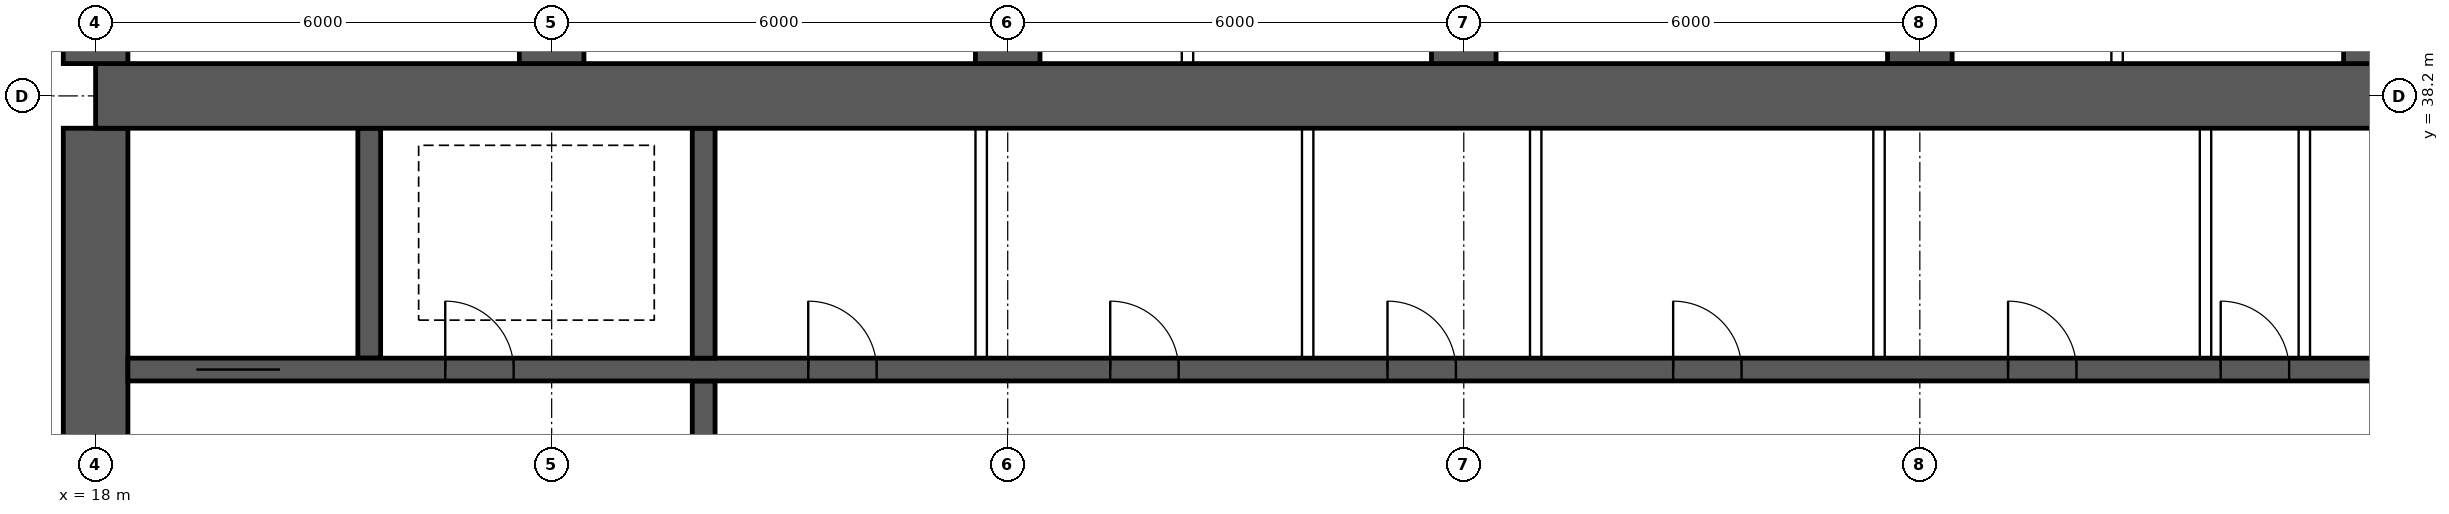
"""IFC4 building model, lengths in metres.
Left out: names, types, materials, properties, quantities, classifications, styles, units other than length and angle.
Written with IfcOpenShell. Run it as: python <this file> out.ifc"""

import sys

from ifc_helpers import new_model, si_unit, direction, frame, frame_2d, origin, place, context, subcontext, project, spatial, rectangle, extrude, element, fill, save


model = new_model("IFC4")
c1 = context("Model", 3, precision=1e-05, world=origin(), true_north=direction((0.0, 1.0)))
c2 = subcontext(c1, "Body", "Model", "MODEL_VIEW")
j1 = project(units=[si_unit("LENGTHUNIT", "METRE"), si_unit("PLANEANGLEUNIT", "RADIAN")], contexts=[c1])
p1 = place(None, origin())
s1 = spatial("IfcSite", under=j1, at=p1, CompositionType="ELEMENT")
p2 = place(p1, origin())
s2 = spatial("IfcBuilding", under=s1, at=p2, CompositionType="ELEMENT")
p3 = place(p2, frame((0.0, 0.0, 178.6)))
s3 = spatial("IfcBuildingStorey", under=s2, at=p3, CompositionType="ELEMENT", Elevation=178.6)
p4 = place(p3, frame((18.0, 38.2, 0.0), z_axis=(0.0, 0.0, 1.0), x_axis=(1.0, 0.0, 0.0)))
e1 = element("IfcWall", 1, at=p4, inside=s3, PredefinedType="SHEAR", context=c2, shape_type="SweptSolid", body=[
    extrude(rectangle(XDim=48.0, YDim=0.85, at=frame_2d((24.0, 0.0))), origin(), (0.0, 0.0, 1.0), 3.75),
])
p5 = place(p3, frame((18.0, 26.225, 0.0), z_axis=(0.0, 0.0, 1.0), x_axis=(0.0, 1.0, 0.0)))
e2 = element("IfcWall", 2, at=p5, inside=s3, PredefinedType="SHEAR", context=c2, shape_type="SweptSolid", body=[
    extrude(rectangle(XDim=11.55, YDim=0.85, at=frame_2d((5.775, 0.0))), origin(), (0.0, 0.0, 1.0), 3.75),
])
p6 = place(p5, frame((5.075, 0.0, 0.0)))
e3 = element("IfcOpeningElement", 3, at=p6, cuts=e2, PredefinedType="OPENING", context=c2, shape_type="SweptSolid", body=[
    extrude(rectangle(XDim=1.2, YDim=2.1, at=frame_2d((0.6, 1.05))), frame((0.0, 0.435, 0.0), z_axis=(0.0, -1.0, 0.0), x_axis=(1.0, 0.0, 0.0)), (0.0, 0.0, 1.0), 0.87),
])
p7 = place(p3, frame((18.425, 34.6, 0.0), z_axis=(0.0, 0.0, 1.0), x_axis=(1.0, 0.0, 0.0)))
e4 = element("IfcWall", 4, at=p7, inside=s3, PredefinedType="SHEAR", context=c2, shape_type="SweptSolid", body=[
    extrude(rectangle(XDim=47.15, YDim=0.3, at=frame_2d((23.575, 0.0))), origin(), (0.0, 0.0, 1.0), 3.75),
])
p8 = place(p7, frame((0.9, 0.0, 0.0)))
e5 = element("IfcOpeningElement", 5, at=p8, cuts=e4, PredefinedType="OPENING", context=c2, shape_type="SweptSolid", body=[
    extrude(rectangle(XDim=1.1, YDim=2.1, at=frame_2d((0.55, 1.05))), frame((0.0, 0.16, 0.0), z_axis=(0.0, -1.0, 0.0), x_axis=(1.0, 0.0, 0.0)), (0.0, 0.0, 1.0), 0.32),
])
p9 = place(p7, frame((45.15, 0.0, 0.0)))
e6 = element("IfcOpeningElement", 6, at=p9, cuts=e4, PredefinedType="OPENING", context=c2, shape_type="SweptSolid", body=[
    extrude(rectangle(XDim=1.1, YDim=2.1, at=frame_2d((0.55, 1.05))), frame((0.0, 0.16, 0.0), z_axis=(0.0, -1.0, 0.0), x_axis=(1.0, 0.0, 0.0)), (0.0, 0.0, 1.0), 0.32),
])
p10 = place(p7, frame((4.175, 0.0, 0.0)))
e7 = element("IfcOpeningElement", 7, at=p10, cuts=e4, PredefinedType="OPENING", context=c2, shape_type="SweptSolid", body=[
    extrude(rectangle(XDim=0.9, YDim=2.1, at=frame_2d((0.45, 1.05))), frame((0.0, 0.16, 0.0), z_axis=(0.0, -1.0, 0.0), x_axis=(1.0, 0.0, 0.0)), (0.0, 0.0, 1.0), 0.32),
])
p11 = place(p7, frame((42.075, 0.0, 0.0)))
e8 = element("IfcOpeningElement", 8, at=p11, cuts=e4, PredefinedType="OPENING", context=c2, shape_type="SweptSolid", body=[
    extrude(rectangle(XDim=0.9, YDim=2.1, at=frame_2d((0.45, 1.05))), frame((0.0, 0.16, 0.0), z_axis=(0.0, -1.0, 0.0), x_axis=(1.0, 0.0, 0.0)), (0.0, 0.0, 1.0), 0.32),
])
p12 = place(p7, frame((8.95, 0.0, 0.0)))
e9 = element("IfcOpeningElement", 9, at=p12, cuts=e4, PredefinedType="OPENING", context=c2, shape_type="SweptSolid", body=[
    extrude(rectangle(XDim=0.9, YDim=2.1, at=frame_2d((0.45, 1.05))), frame((0.0, 0.16, 0.0), z_axis=(0.0, -1.0, 0.0), x_axis=(1.0, 0.0, 0.0)), (0.0, 0.0, 1.0), 0.32),
])
p13 = place(p7, frame((12.924, 0.0, 0.0)))
e10 = element("IfcOpeningElement", 10, at=p13, cuts=e4, PredefinedType="OPENING", context=c2, shape_type="SweptSolid", body=[
    extrude(rectangle(XDim=0.9, YDim=2.1, at=frame_2d((0.45, 1.05))), frame((0.0, 0.16, 0.0), z_axis=(0.0, -1.0, 0.0), x_axis=(1.0, 0.0, 0.0)), (0.0, 0.0, 1.0), 0.32),
])
p14 = place(p7, frame((16.571, 0.0, 0.0)))
e11 = element("IfcOpeningElement", 11, at=p14, cuts=e4, PredefinedType="OPENING", context=c2, shape_type="SweptSolid", body=[
    extrude(rectangle(XDim=0.9, YDim=2.1, at=frame_2d((0.45, 1.05))), frame((0.0, 0.16, 0.0), z_axis=(0.0, -1.0, 0.0), x_axis=(1.0, 0.0, 0.0)), (0.0, 0.0, 1.0), 0.32),
])
p15 = place(p7, frame((20.33, 0.0, 0.0)))
e12 = element("IfcOpeningElement", 12, at=p15, cuts=e4, PredefinedType="OPENING", context=c2, shape_type="SweptSolid", body=[
    extrude(rectangle(XDim=0.9, YDim=2.1, at=frame_2d((0.45, 1.05))), frame((0.0, 0.16, 0.0), z_axis=(0.0, -1.0, 0.0), x_axis=(1.0, 0.0, 0.0)), (0.0, 0.0, 1.0), 0.32),
])
p16 = place(p7, frame((24.736, 0.0, 0.0)))
e13 = element("IfcOpeningElement", 13, at=p16, cuts=e4, PredefinedType="OPENING", context=c2, shape_type="SweptSolid", body=[
    extrude(rectangle(XDim=0.9, YDim=2.1, at=frame_2d((0.45, 1.05))), frame((0.0, 0.16, 0.0), z_axis=(0.0, -1.0, 0.0), x_axis=(1.0, 0.0, 0.0)), (0.0, 0.0, 1.0), 0.32),
])
p17 = place(p7, frame((27.533, 0.0, 0.0)))
e14 = element("IfcOpeningElement", 14, at=p17, cuts=e4, PredefinedType="OPENING", context=c2, shape_type="SweptSolid", body=[
    extrude(rectangle(XDim=0.9, YDim=2.1, at=frame_2d((0.45, 1.05))), frame((0.0, 0.16, 0.0), z_axis=(0.0, -1.0, 0.0), x_axis=(1.0, 0.0, 0.0)), (0.0, 0.0, 1.0), 0.32),
])
p18 = place(p7, frame((33.654, 0.0, 0.0)))
e15 = element("IfcOpeningElement", 15, at=p18, cuts=e4, PredefinedType="OPENING", context=c2, shape_type="SweptSolid", body=[
    extrude(rectangle(XDim=0.9, YDim=2.1, at=frame_2d((0.45, 1.05))), frame((0.0, 0.16, 0.0), z_axis=(0.0, -1.0, 0.0), x_axis=(1.0, 0.0, 0.0)), (0.0, 0.0, 1.0), 0.32),
])
p19 = place(p3, frame((26.0, 30.55, 0.0), z_axis=(0.0, 0.0, 1.0), x_axis=(0.0, 1.0, 0.0)))
e16 = element("IfcWall", 16, at=p19, inside=s3, PredefinedType="SHEAR", context=c2, shape_type="SweptSolid", body=[
    extrude(rectangle(XDim=3.9, YDim=0.3, at=frame_2d((1.95, 0.0))), origin(), (0.0, 0.0, 1.0), 3.75),
])
p20 = place(p19, frame((1.4, 0.0, 0.0)))
e17 = element("IfcOpeningElement", 17, at=p20, cuts=e16, PredefinedType="OPENING", context=c2, shape_type="SweptSolid", body=[
    extrude(rectangle(XDim=1.2, YDim=2.1, at=frame_2d((0.6, 1.05))), frame((0.0, 0.16, 0.0), z_axis=(0.0, -1.0, 0.0), x_axis=(1.0, 0.0, 0.0)), (0.0, 0.0, 1.0), 0.32),
])
for number, where, z_axis, x_axis in (
    (18, (21.6, 34.75, 0.0), (0.0, 0.0, 1.0), (0.0, 1.0, 0.0)),
    (19, (26.0, 34.75, 0.0), (0.0, 0.0, 1.0), (0.0, 1.0, 0.0)),
):
    element("IfcWall", number, at=place(p3, frame(where, z_axis=z_axis, x_axis=x_axis)), inside=s3, PredefinedType="SHEAR", context=c2, shape_type="SweptSolid", body=[
        extrude(rectangle(XDim=3.025, YDim=0.3, at=frame_2d((1.512, 0.0))), origin(), (0.0, 0.0, 1.0), 3.75),
    ])
for number, where, z_axis, x_axis in (
    (20, (18.0, 38.625, 0.0), (0.0, 0.0, 1.0), (0.0, 1.0, 0.0)),
    (21, (24.0, 38.625, 0.0), (0.0, 0.0, 1.0), (0.0, 1.0, 0.0)),
    (22, (30.0, 38.625, 0.0), (0.0, 0.0, 1.0), (0.0, 1.0, 0.0)),
    (23, (36.0, 38.625, 0.0), (0.0, 0.0, 1.0), (0.0, 1.0, 0.0)),
    (24, (42.0, 38.625, 0.0), (0.0, 0.0, 1.0), (0.0, 1.0, 0.0)),
    (25, (48.0, 38.625, 0.0), (0.0, 0.0, 1.0), (0.0, 1.0, 0.0)),
):
    element("IfcWall", number, at=place(p3, frame(where, z_axis=z_axis, x_axis=x_axis)), inside=s3, PredefinedType="SHEAR", context=c2, shape_type="SweptSolid", body=[
        extrude(rectangle(XDim=8.175, YDim=0.85, at=frame_2d((4.087, 0.0))), origin(), (0.0, 0.0, 1.0), 3.75),
    ])
for number, where, z_axis, x_axis in (
    (26, (29.651, 34.75, 0.0), (0.0, 0.0, 1.0), (0.0, 1.0, 0.0)),
    (27, (33.946, 34.75, 0.0), (0.0, 0.0, 1.0), (0.0, 1.0, 0.0)),
    (28, (36.946, 34.75, 0.0), (0.0, 0.0, 1.0), (0.0, 1.0, 0.0)),
    (29, (41.463, 34.75, 0.0), (0.0, 0.0, 1.0), (0.0, 1.0, 0.0)),
    (30, (45.758, 34.75, 0.0), (0.0, 0.0, 1.0), (0.0, 1.0, 0.0)),
    (31, (47.058, 34.75, 0.0), (0.0, 0.0, 1.0), (0.0, 1.0, 0.0)),
):
    element("IfcWall", number, at=place(p3, frame(where, z_axis=z_axis, x_axis=x_axis)), inside=s3, PredefinedType="SOLIDWALL", context=c2, shape_type="SweptSolid", body=[
        extrude(rectangle(XDim=3.025, YDim=0.15, at=frame_2d((1.512, 0.0))), origin(), (0.0, 0.0, 1.0), 3.5),
    ])
for number, where, z_axis, x_axis in (
    (32, (32.365, 38.625, 0.0), (0.0, 0.0, 1.0), (0.0, 1.0, 0.0)),
    (33, (44.595, 38.625, 0.0), (0.0, 0.0, 1.0), (0.0, 1.0, 0.0)),
):
    element("IfcWall", number, at=place(p3, frame(where, z_axis=z_axis, x_axis=x_axis)), inside=s3, PredefinedType="PARTITIONING", context=c2, shape_type="SweptSolid", body=[
        extrude(rectangle(XDim=8.075, YDim=0.15, at=frame_2d((4.038, 0.0))), origin(), (0.0, 0.0, 1.0), 3.5),
    ])
p21 = place(p8, origin())
e34 = element("IfcDoor", 34, at=p21, inside=s3, OperationType="DOUBLE_DOOR_SLIDING", PredefinedType="DOOR", context=c2, shape_type="SweptSolid", body=[
    extrude(rectangle(XDim=1.1, YDim=2.1, at=frame_2d((0.55, 1.05))), frame((0.0, 0.025, 0.0), z_axis=(0.0, -1.0, 0.0), x_axis=(1.0, 0.0, 0.0)), (0.0, 0.0, 1.0), 0.05),
])
fill(e5, e34)
p22 = place(p10, origin())
e35 = element("IfcDoor", 35, at=p22, inside=s3, OperationType="SINGLE_SWING_LEFT", PredefinedType="DOOR", context=c2, shape_type="SweptSolid", body=[
    extrude(rectangle(XDim=0.9, YDim=2.1, at=frame_2d((0.45, 1.05))), frame((0.0, 0.025, 0.0), z_axis=(0.0, -1.0, 0.0), x_axis=(1.0, 0.0, 0.0)), (0.0, 0.0, 1.0), 0.05),
])
fill(e7, e35)
p23 = place(p12, origin())
e36 = element("IfcDoor", 36, at=p23, inside=s3, OperationType="SINGLE_SWING_LEFT", PredefinedType="DOOR", context=c2, shape_type="SweptSolid", body=[
    extrude(rectangle(XDim=0.9, YDim=2.1, at=frame_2d((0.45, 1.05))), frame((0.0, 0.025, 0.0), z_axis=(0.0, -1.0, 0.0), x_axis=(1.0, 0.0, 0.0)), (0.0, 0.0, 1.0), 0.05),
])
fill(e9, e36)
p24 = place(p13, origin())
e37 = element("IfcDoor", 37, at=p24, inside=s3, OperationType="SINGLE_SWING_LEFT", PredefinedType="DOOR", context=c2, shape_type="SweptSolid", body=[
    extrude(rectangle(XDim=0.9, YDim=2.1, at=frame_2d((0.45, 1.05))), frame((0.0, 0.025, 0.0), z_axis=(0.0, -1.0, 0.0), x_axis=(1.0, 0.0, 0.0)), (0.0, 0.0, 1.0), 0.05),
])
fill(e10, e37)
p25 = place(p14, origin())
e38 = element("IfcDoor", 38, at=p25, inside=s3, OperationType="SINGLE_SWING_LEFT", PredefinedType="DOOR", context=c2, shape_type="SweptSolid", body=[
    extrude(rectangle(XDim=0.9, YDim=2.1, at=frame_2d((0.45, 1.05))), frame((0.0, 0.025, 0.0), z_axis=(0.0, -1.0, 0.0), x_axis=(1.0, 0.0, 0.0)), (0.0, 0.0, 1.0), 0.05),
])
fill(e11, e38)
p26 = place(p15, origin())
e39 = element("IfcDoor", 39, at=p26, inside=s3, OperationType="SINGLE_SWING_LEFT", PredefinedType="DOOR", context=c2, shape_type="SweptSolid", body=[
    extrude(rectangle(XDim=0.9, YDim=2.1, at=frame_2d((0.45, 1.05))), frame((0.0, 0.025, 0.0), z_axis=(0.0, -1.0, 0.0), x_axis=(1.0, 0.0, 0.0)), (0.0, 0.0, 1.0), 0.05),
])
fill(e12, e39)
p27 = place(p16, origin())
e40 = element("IfcDoor", 40, at=p27, inside=s3, OperationType="SINGLE_SWING_LEFT", PredefinedType="DOOR", context=c2, shape_type="SweptSolid", body=[
    extrude(rectangle(XDim=0.9, YDim=2.1, at=frame_2d((0.45, 1.05))), frame((0.0, 0.025, 0.0), z_axis=(0.0, -1.0, 0.0), x_axis=(1.0, 0.0, 0.0)), (0.0, 0.0, 1.0), 0.05),
])
fill(e13, e40)
p28 = place(p17, origin())
e41 = element("IfcDoor", 41, at=p28, inside=s3, OperationType="SINGLE_SWING_LEFT", PredefinedType="DOOR", context=c2, shape_type="SweptSolid", body=[
    extrude(rectangle(XDim=0.9, YDim=2.1, at=frame_2d((0.45, 1.05))), frame((0.0, 0.025, 0.0), z_axis=(0.0, -1.0, 0.0), x_axis=(1.0, 0.0, 0.0)), (0.0, 0.0, 1.0), 0.05),
])
fill(e14, e41)
save(model, sys.argv[1])
